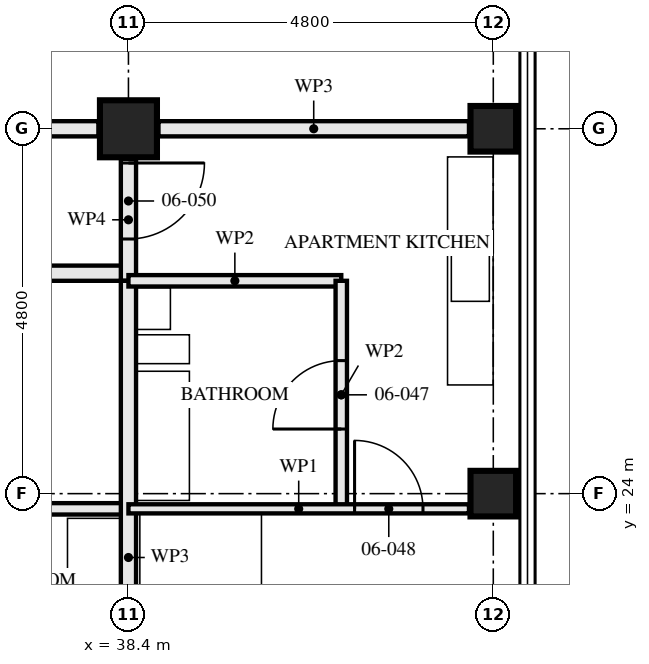
"""IFC4 building model, lengths in metres.
Left out: names, types, materials, properties, quantities, classifications, styles, units other than length and angle.
Written with IfcOpenShell. Run it as: python <this file> out.ifc"""

import sys

from ifc_helpers import new_model, si_unit, direction, frame, frame_2d, origin, origin_2d, place, context, subcontext, project, spatial, rectangle, hollow_rectangle, extrude, element, fill, save


model = new_model("IFC4")
c1 = context("Model", 3, precision=1e-05, world=origin(), true_north=direction((0.0, 1.0)))
c2 = subcontext(c1, "Body", "Model", "MODEL_VIEW")
j1 = project(units=[si_unit("LENGTHUNIT", "METRE"), si_unit("PLANEANGLEUNIT", "RADIAN")], contexts=[c1])
p1 = place(None, origin())
s1 = spatial("IfcSite", under=j1, at=p1, CompositionType="ELEMENT")
p2 = place(p1, origin())
s2 = spatial("IfcBuilding", under=s1, at=p2, CompositionType="ELEMENT")
p3 = place(p2, frame((0.0, 0.0, 27.0)))
s3 = spatial("IfcBuildingStorey", under=s2, at=p3, CompositionType="ELEMENT", Elevation=27.0)
p4 = place(p3, frame((38.4, 28.8, 0.0), z_axis=(0.0, 0.0, 1.0), x_axis=(0.0, 1.0, 0.0)))
e1 = element("IfcColumn", 1, at=p4, inside=s3, PredefinedType="COLUMN", context=c2, shape_type="SweptSolid", body=[
    extrude(hollow_rectangle(XDim=0.75, YDim=0.75, WallThickness=0.08, at=origin_2d()), origin(), (0.0, 0.0, 1.0), 3.5),
])
for number, where, z_axis, x_axis in (
    (2, (43.2, 24.0, 0.0), (0.0, 0.0, 1.0), (1.0, 0.0, 0.0)),
    (3, (43.2, 28.8, 0.0), (0.0, 0.0, 1.0), (0.0, 1.0, 0.0)),
):
    element("IfcColumn", number, at=place(p3, frame(where, z_axis=z_axis, x_axis=x_axis)), inside=s3, PredefinedType="COLUMN", context=c2, shape_type="SweptSolid", body=[
        extrude(hollow_rectangle(XDim=0.6, YDim=0.6, WallThickness=0.08, at=origin_2d()), origin(), (0.0, 0.0, 1.0), 3.5),
    ])
p5 = place(p3, frame((35.6, 23.8, 0.0), z_axis=(0.0, 0.0, 1.0), x_axis=(1.0, 0.0, 0.0)))
e4 = element("IfcWall", 4, at=p5, inside=s3, PredefinedType="PARTITIONING", context=c2, shape_type="SweptSolid", body=[
    extrude(rectangle(XDim=2.8, YDim=0.15, at=frame_2d((1.4, 0.0))), origin(), (0.0, 0.0, 1.0), 3.33),
])
p6 = place(p3, frame((38.4, 19.52, 0.0), z_axis=(0.0, 0.0, 1.0), x_axis=(0.0, 1.0, 0.0)))
e5 = element("IfcWall", 5, at=p6, inside=s3, PredefinedType="PARTITIONING", context=c2, shape_type="SweptSolid", body=[
    extrude(rectangle(XDim=7.28, YDim=0.2, at=frame_2d((3.64, 0.0))), origin(), (0.0, 0.0, 1.0), 2.55),
])
p7 = place(p3, frame((41.2, 23.8, 0.0), z_axis=(0.0, 0.0, 1.0), x_axis=(0.0, 1.0, 0.0)))
e6 = element("IfcWall", 6, at=p7, inside=s3, PredefinedType="PARTITIONING", context=c2, shape_type="SweptSolid", body=[
    extrude(rectangle(XDim=3.0, YDim=0.15, at=frame_2d((1.5, 0.0))), origin(), (0.0, 0.0, 1.0), 2.55),
])
p8 = place(p7, frame((1.05, 0.0, 0.0)))
e7 = element("IfcOpeningElement", 7, at=p8, cuts=e6, PredefinedType="OPENING", context=c2, shape_type="SweptSolid", body=[
    extrude(rectangle(XDim=0.9, YDim=2.1, at=frame_2d((0.45, 1.05))), frame((0.0, 0.085, 0.0), z_axis=(0.0, -1.0, 0.0), x_axis=(1.0, 0.0, 0.0)), (0.0, 0.0, 1.0), 0.171),
])
p9 = place(p3, frame((38.4, 26.8, 0.0), z_axis=(0.0, 0.0, 1.0), x_axis=(1.0, 0.0, 0.0)))
e8 = element("IfcWall", 8, at=p9, inside=s3, PredefinedType="PARTITIONING", context=c2, shape_type="SweptSolid", body=[
    extrude(rectangle(XDim=2.8, YDim=0.15, at=frame_2d((1.4, 0.0))), origin(), (0.0, 0.0, 1.0), 3.33),
])
p10 = place(p3, frame((38.4, 23.8, 0.0), z_axis=(0.0, 0.0, 1.0), x_axis=(1.0, 0.0, 0.0)))
e9 = element("IfcWall", 9, at=p10, inside=s3, PredefinedType="PARTITIONING", context=c2, shape_type="SweptSolid", body=[
    extrude(rectangle(XDim=4.48, YDim=0.12, at=frame_2d((2.24, 0.0))), origin(), (0.0, 0.0, 1.0), 3.33),
])
p11 = place(p10, frame((2.975, 0.0, 0.0)))
e10 = element("IfcOpeningElement", 10, at=p11, cuts=e9, PredefinedType="OPENING", context=c2, shape_type="SweptSolid", body=[
    extrude(rectangle(XDim=0.9, YDim=2.1, at=frame_2d((0.45, 1.05))), frame((0.0, 0.071, 0.0), z_axis=(0.0, -1.0, 0.0), x_axis=(1.0, 0.0, 0.0)), (0.0, 0.0, 1.0), 0.141),
])
p12 = place(p3, frame((28.8, 26.9, 0.0), z_axis=(0.0, 0.0, 1.0), x_axis=(1.0, 0.0, 0.0)))
e11 = element("IfcWall", 11, at=p12, inside=s3, PredefinedType="PARTITIONING", context=c2, shape_type="SweptSolid", body=[
    extrude(rectangle(XDim=9.6, YDim=0.2, at=frame_2d((4.8, 0.0))), origin(), (0.0, 0.0, 1.0), 3.33),
])
p13 = place(p12, frame((5.2, 0.0, 0.0)))
e12 = element("IfcOpeningElement", 12, at=p13, cuts=e11, PredefinedType="OPENING", context=c2, shape_type="SweptSolid", body=[
    extrude(rectangle(XDim=1.0, YDim=2.1, at=frame_2d((0.5, 1.05))), frame((0.0, 0.111, 0.0), z_axis=(0.0, -1.0, 0.0), x_axis=(1.0, 0.0, 0.0)), (0.0, 0.0, 1.0), 0.221),
])
p14 = place(p3, frame((38.4, 26.8, 0.0), z_axis=(0.0, 0.0, 1.0), x_axis=(0.0, 1.0, 0.0)))
e13 = element("IfcWall", 13, at=p14, inside=s3, PredefinedType="PARTITIONING", context=c2, shape_type="SweptSolid", body=[
    extrude(rectangle(XDim=1.605, YDim=0.2, at=frame_2d((0.802, 0.0))), origin(), (0.0, 0.0, 1.0), 3.33),
])
p15 = place(p14, frame((0.55, 0.0, 0.0)))
e14 = element("IfcOpeningElement", 14, at=p15, cuts=e13, PredefinedType="OPENING", context=c2, shape_type="SweptSolid", body=[
    extrude(rectangle(XDim=1.0, YDim=2.1, at=frame_2d((0.5, 1.05))), frame((0.0, 0.111, 0.0), z_axis=(0.0, -1.0, 0.0), x_axis=(1.0, 0.0, 0.0)), (0.0, 0.0, 1.0), 0.221),
])
p16 = place(p3, frame((42.88, 28.8, 0.0), z_axis=(0.0, 0.0, 1.0), x_axis=(-1.0, 0.0, 0.0)))
e15 = element("IfcWall", 15, at=p16, inside=s3, PredefinedType="PARTITIONING", context=c2, shape_type="SweptSolid", body=[
    extrude(rectangle(XDim=4.085, YDim=0.2, at=frame_2d((2.042, 0.0))), origin(), (0.0, 0.0, 1.0), 2.32),
])
p17 = place(p3, frame((38.005, 28.8, 0.0), z_axis=(0.0, 0.0, 1.0), x_axis=(-1.0, 0.0, 0.0)))
e16 = element("IfcWall", 16, at=p17, inside=s3, PredefinedType="PARTITIONING", context=c2, shape_type="SweptSolid", body=[
    extrude(rectangle(XDim=4.01, YDim=0.2, at=frame_2d((2.005, 0.0))), origin(), (0.0, 0.0, 1.0), 2.32),
])
p18 = place(p8, origin())
e17 = element("IfcDoor", 17, at=p18, inside=s3, OperationType="SINGLE_SWING_RIGHT", PredefinedType="DOOR", context=c2, shape_type="SweptSolid", body=[
    extrude(rectangle(XDim=0.9, YDim=2.1, at=frame_2d((0.45, 1.05))), frame((0.0, 0.022, 0.0), z_axis=(0.0, -1.0, 0.0), x_axis=(1.0, 0.0, 0.0)), (0.0, 0.0, 1.0), 0.044),
])
fill(e7, e17)
p19 = place(p11, origin())
e18 = element("IfcDoor", 18, at=p19, inside=s3, OperationType="SINGLE_SWING_RIGHT", PredefinedType="DOOR", context=c2, shape_type="SweptSolid", body=[
    extrude(rectangle(XDim=0.9, YDim=2.1, at=frame_2d((0.45, 1.05))), frame((0.0, 0.022, 0.0), z_axis=(0.0, -1.0, 0.0), x_axis=(1.0, 0.0, 0.0)), (0.0, 0.0, 1.0), 0.044),
])
fill(e10, e18)
p20 = place(p15, frame((1.0, 0.0, 0.0), z_axis=(0.0, 0.0, 1.0), x_axis=(-1.0, 0.0, 0.0)))
e19 = element("IfcDoor", 19, at=p20, inside=s3, OperationType="SINGLE_SWING_RIGHT", PredefinedType="DOOR", context=c2, shape_type="SweptSolid", body=[
    extrude(rectangle(XDim=1.0, YDim=2.1, at=frame_2d((0.5, 1.05))), frame((0.0, 0.027, 0.0), z_axis=(0.0, -1.0, 0.0), x_axis=(1.0, 0.0, 0.0)), (0.0, 0.0, 1.0), 0.054),
])
fill(e14, e19)
save(model, sys.argv[1])
